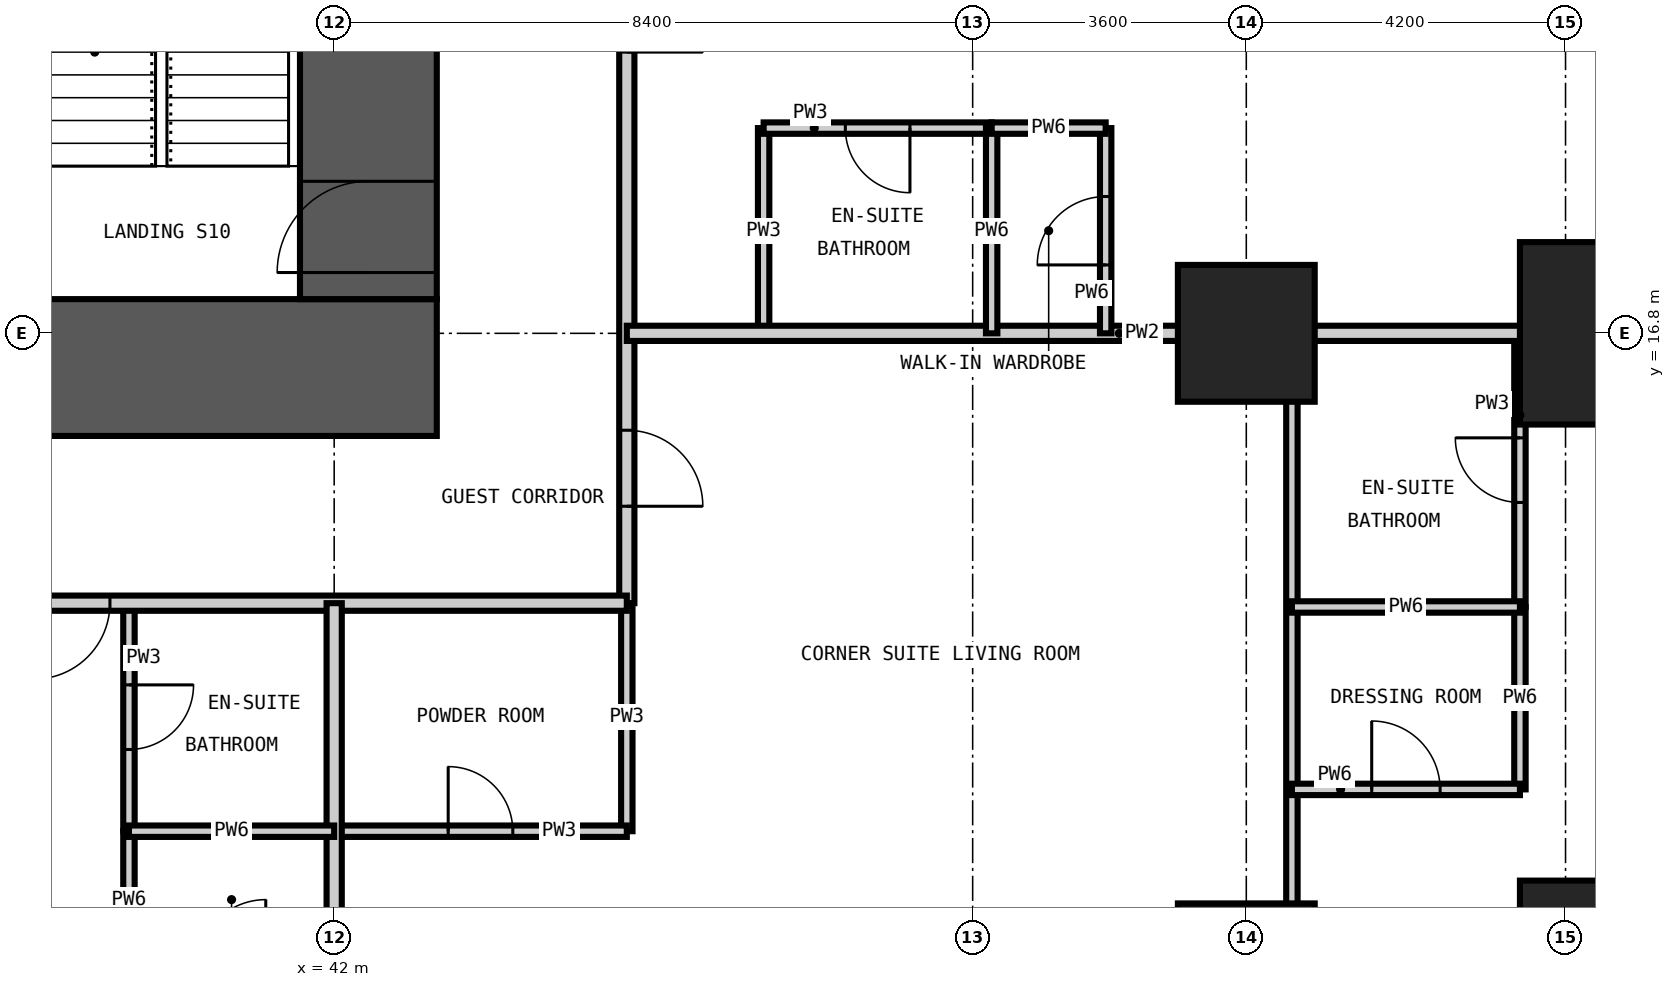
"""IFC4 building model, lengths in metres.
Left out: names, types, materials, properties, quantities, classifications, styles, units other than length and angle.
Written with IfcOpenShell. Run it as: python <this file> out.ifc"""

import sys

from ifc_helpers import new_model, si_unit, direction, frame, frame_2d, origin, origin_2d, place, context, subcontext, project, spatial, rectangle, extrude, element, fill, save


model = new_model("IFC4")
c1 = context("Model", 3, precision=1e-05, world=origin(), true_north=direction((0.0, 1.0)))
c2 = subcontext(c1, "Body", "Model", "MODEL_VIEW")
j1 = project(units=[si_unit("LENGTHUNIT", "METRE"), si_unit("PLANEANGLEUNIT", "RADIAN")], contexts=[c1])
p1 = place(None, origin())
s1 = spatial("IfcSite", under=j1, at=p1, CompositionType="ELEMENT")
p2 = place(p1, origin())
s2 = spatial("IfcBuilding", under=s1, at=p2, CompositionType="ELEMENT")
p3 = place(p2, frame((0.0, 0.0, 34.2)))
s3 = spatial("IfcBuildingStorey", under=s2, at=p3, CompositionType="ELEMENT", Elevation=34.2)
for number, where, z_axis, x_axis in (
    (1, (54.0, 8.4, -0.35), (0.0, 0.0, 1.0), (1.0, 0.0, 0.0)),
    (2, (54.0, 16.8, -0.35), (0.0, 0.0, 1.0), (1.0, 0.0, 0.0)),
):
    element("IfcColumn", number, at=place(p3, frame(where, z_axis=z_axis, x_axis=x_axis)), inside=s3, PredefinedType="COLUMN", context=c2, shape_type="SweptSolid", body=[
        extrude(rectangle(XDim=1.8, YDim=1.8, at=origin_2d()), origin(), (0.0, 0.0, 1.0), 3.6),
    ])
for number, where, z_axis, x_axis in (
    (3, (58.2, 8.4, -0.35), (0.0, 0.0, 1.0), (1.0, 0.0, 0.0)),
    (4, (58.2, 16.8, -0.35), (0.0, 0.0, 1.0), (1.0, 0.0, 0.0)),
):
    element("IfcColumn", number, at=place(p3, frame(where, z_axis=z_axis, x_axis=x_axis)), inside=s3, PredefinedType="COLUMN", context=c2, shape_type="SweptSolid", body=[
        extrude(rectangle(XDim=1.2, YDim=2.4, at=origin_2d()), origin(), (0.0, 0.0, 1.0), 3.6),
    ])
p4 = place(p3, frame((15.45, 16.35, -0.35), z_axis=(0.0, 0.0, 1.0), x_axis=(1.0, 0.0, 0.0)))
e5 = element("IfcWall", 5, at=p4, inside=s3, PredefinedType="SHEAR", context=c2, shape_type="SweptSolid", body=[
    extrude(rectangle(XDim=27.9, YDim=1.8, at=frame_2d((13.95, 0.0))), origin(), (0.0, 0.0, 1.0), 3.6),
])
p5 = place(p4, frame((13.45, 0.0, 0.35)))
e6 = element("IfcOpeningElement", 6, at=p5, cuts=e5, PredefinedType="OPENING", context=c2, shape_type="SweptSolid", body=[
    extrude(rectangle(XDim=1.0, YDim=2.1, at=frame_2d((0.5, 1.05))), frame((0.0, 0.91, 0.0), z_axis=(0.0, -1.0, 0.0), x_axis=(1.0, 0.0, 0.0)), (0.0, 0.0, 1.0), 1.82),
])
p6 = place(p4, frame((19.75, 0.0, 0.35)))
e7 = element("IfcOpeningElement", 7, at=p6, cuts=e5, PredefinedType="OPENING", context=c2, shape_type="SweptSolid", body=[
    extrude(rectangle(XDim=1.0, YDim=2.1, at=frame_2d((0.5, 1.05))), frame((0.0, 0.91, 0.0), z_axis=(0.0, -1.0, 0.0), x_axis=(1.0, 0.0, 0.0)), (0.0, 0.0, 1.0), 1.82),
])
p7 = place(p3, frame((42.45, 17.25, -0.35), z_axis=(0.0, 0.0, 1.0), x_axis=(0.0, 1.0, 0.0)))
e8 = element("IfcWall", 8, at=p7, inside=s3, PredefinedType="SHEAR", context=c2, shape_type="SweptSolid", body=[
    extrude(rectangle(XDim=24.3, YDim=1.8, at=frame_2d((12.15, 0.0))), origin(), (0.0, 0.0, 1.0), 3.6),
])
p8 = place(p7, frame((0.35, 0.0, 0.35)))
e9 = element("IfcOpeningElement", 9, at=p8, cuts=e8, PredefinedType="OPENING", context=c2, shape_type="SweptSolid", body=[
    extrude(rectangle(XDim=1.2, YDim=2.2, at=frame_2d((0.6, 1.1))), frame((0.0, 0.91, 0.0), z_axis=(0.0, -1.0, 0.0), x_axis=(1.0, 0.0, 0.0)), (0.0, 0.0, 1.0), 1.82),
])
p9 = place(p7, frame((11.65, 0.0, 0.35)))
e10 = element("IfcOpeningElement", 10, at=p9, cuts=e8, PredefinedType="OPENING", context=c2, shape_type="SweptSolid", body=[
    extrude(rectangle(XDim=1.0, YDim=2.1, at=frame_2d((0.5, 1.05))), frame((0.0, 0.91, 0.0), z_axis=(0.0, -1.0, 0.0), x_axis=(1.0, 0.0, 0.0)), (0.0, 0.0, 1.0), 1.82),
])
p10 = place(p7, frame((20.05, 0.0, 0.35)))
e11 = element("IfcOpeningElement", 11, at=p10, cuts=e8, PredefinedType="OPENING", context=c2, shape_type="SweptSolid", body=[
    extrude(rectangle(XDim=1.0, YDim=2.1, at=frame_2d((0.5, 1.05))), frame((0.0, 0.91, 0.0), z_axis=(0.0, -1.0, 0.0), x_axis=(1.0, 0.0, 0.0)), (0.0, 0.0, 1.0), 1.82),
])
p11 = place(p3, frame((39.3, 10.25, 0.0), z_axis=(0.0, 0.0, 1.0), x_axis=(0.0, 1.0, 0.0)))
e12 = element("IfcWall", 12, at=p11, inside=s3, PredefinedType="PARTITIONING", context=c2, shape_type="SweptSolid", body=[
    extrude(rectangle(XDim=3.0, YDim=0.15, at=frame_2d((1.5, 0.0))), origin(), (0.0, 0.0, 1.0), 3.25),
])
p12 = place(p11, frame((1.075, 0.0, 0.0)))
e13 = element("IfcOpeningElement", 13, at=p12, cuts=e12, PredefinedType="OPENING", context=c2, shape_type="SweptSolid", body=[
    extrude(rectangle(XDim=0.85, YDim=2.1, at=frame_2d((0.425, 1.05))), frame((0.0, 0.085, 0.0), z_axis=(0.0, -1.0, 0.0), x_axis=(1.0, 0.0, 0.0)), (0.0, 0.0, 1.0), 0.17),
])
p13 = place(p3, frame((45.85, 10.25, 0.0), z_axis=(0.0, 0.0, 1.0), x_axis=(0.0, 1.0, 0.0)))
e14 = element("IfcWall", 14, at=p13, inside=s3, PredefinedType="PARTITIONING", context=c2, shape_type="SweptSolid", body=[
    extrude(rectangle(XDim=3.0, YDim=0.15, at=frame_2d((1.5, 0.0))), origin(), (0.0, 0.0, 1.0), 3.25),
])
p14 = place(p3, frame((47.65, 16.8, 0.0), z_axis=(0.0, 0.0, 1.0), x_axis=(0.0, 1.0, 0.0)))
e15 = element("IfcWall", 15, at=p14, inside=s3, PredefinedType="PARTITIONING", context=c2, shape_type="SweptSolid", body=[
    extrude(rectangle(XDim=2.7, YDim=0.15, at=frame_2d((1.35, 0.0))), origin(), (0.0, 0.0, 1.0), 3.25),
])
p15 = place(p3, frame((57.6, 13.2, 0.0), z_axis=(0.0, 0.0, 1.0), x_axis=(0.0, 1.0, 0.0)))
e16 = element("IfcWall", 16, at=p15, inside=s3, PredefinedType="PARTITIONING", context=c2, shape_type="SweptSolid", body=[
    extrude(rectangle(XDim=3.6, YDim=0.15, at=frame_2d((1.8, 0.0))), origin(), (0.0, 0.0, 1.0), 3.25),
])
p16 = place(p15, frame((1.375, 0.0, 0.0)))
e17 = element("IfcOpeningElement", 17, at=p16, cuts=e16, PredefinedType="OPENING", context=c2, shape_type="SweptSolid", body=[
    extrude(rectangle(XDim=0.85, YDim=2.1, at=frame_2d((0.425, 1.05))), frame((0.0, 0.085, 0.0), z_axis=(0.0, -1.0, 0.0), x_axis=(1.0, 0.0, 0.0)), (0.0, 0.0, 1.0), 0.17),
])
p17 = place(p3, frame((42.0, 10.25, 0.0), z_axis=(0.0, 0.0, 1.0), x_axis=(1.0, 0.0, 0.0)))
e18 = element("IfcWall", 18, at=p17, inside=s3, PredefinedType="PARTITIONING", context=c2, shape_type="SweptSolid", body=[
    extrude(rectangle(XDim=3.85, YDim=0.15, at=frame_2d((1.925, 0.0))), origin(), (0.0, 0.0, 1.0), 3.25),
])
p18 = place(p17, frame((1.5, 0.0, 0.0)))
e19 = element("IfcOpeningElement", 19, at=p18, cuts=e18, PredefinedType="OPENING", context=c2, shape_type="SweptSolid", body=[
    extrude(rectangle(XDim=0.85, YDim=2.1, at=frame_2d((0.425, 1.05))), frame((0.0, 0.085, 0.0), z_axis=(0.0, -1.0, 0.0), x_axis=(1.0, 0.0, 0.0)), (0.0, 0.0, 1.0), 0.17),
])
p19 = place(p3, frame((47.65, 19.5, 0.0), z_axis=(0.0, 0.0, 1.0), x_axis=(1.0, 0.0, 0.0)))
e20 = element("IfcWall", 20, at=p19, inside=s3, PredefinedType="PARTITIONING", context=c2, shape_type="SweptSolid", body=[
    extrude(rectangle(XDim=3.0, YDim=0.15, at=frame_2d((1.5, 0.0))), origin(), (0.0, 0.0, 1.0), 3.25),
])
p20 = place(p19, frame((1.075, 0.0, 0.0)))
e21 = element("IfcOpeningElement", 21, at=p20, cuts=e20, PredefinedType="OPENING", context=c2, shape_type="SweptSolid", body=[
    extrude(rectangle(XDim=0.85, YDim=2.1, at=frame_2d((0.425, 1.05))), frame((0.0, 0.085, 0.0), z_axis=(0.0, -1.0, 0.0), x_axis=(1.0, 0.0, 0.0)), (0.0, 0.0, 1.0), 0.17),
])
p21 = place(p3, frame((45.85, 45.25, 0.0), z_axis=(0.0, 0.0, 1.0), x_axis=(0.0, -1.0, 0.0)))
e22 = element("IfcWall", 22, at=p21, inside=s3, PredefinedType="PARTITIONING", context=c2, shape_type="SweptSolid", body=[
    extrude(rectangle(XDim=32.0, YDim=0.2, at=frame_2d((16.0, 0.0))), origin(), (0.0, 0.0, 1.0), 3.25),
])
p22 = place(p21, frame((23.75, 0.0, 0.0)))
e23 = element("IfcOpeningElement", 23, at=p22, cuts=e22, PredefinedType="OPENING", context=c2, shape_type="SweptSolid", body=[
    extrude(rectangle(XDim=1.0, YDim=2.2, at=frame_2d((0.5, 1.1))), frame((0.0, 0.11, 0.0), z_axis=(0.0, -1.0, 0.0), x_axis=(1.0, 0.0, 0.0)), (0.0, 0.0, 1.0), 0.22),
])
p23 = place(p21, frame((15.35, 0.0, 0.0)))
e24 = element("IfcOpeningElement", 24, at=p23, cuts=e22, PredefinedType="OPENING", context=c2, shape_type="SweptSolid", body=[
    extrude(rectangle(XDim=1.0, YDim=2.2, at=frame_2d((0.5, 1.1))), frame((0.0, 0.11, 0.0), z_axis=(0.0, -1.0, 0.0), x_axis=(1.0, 0.0, 0.0)), (0.0, 0.0, 1.0), 0.22),
])
p24 = place(p21, frame((6.95, 0.0, 0.0)))
e25 = element("IfcOpeningElement", 25, at=p24, cuts=e22, PredefinedType="OPENING", context=c2, shape_type="SweptSolid", body=[
    extrude(rectangle(XDim=1.0, YDim=2.2, at=frame_2d((0.5, 1.1))), frame((0.0, 0.11, 0.0), z_axis=(0.0, -1.0, 0.0), x_axis=(1.0, 0.0, 0.0)), (0.0, 0.0, 1.0), 0.22),
])
p25 = place(p21, frame((29.725, 0.0, 0.0)))
e26 = element("IfcOpeningElement", 26, at=p25, cuts=e22, PredefinedType="OPENING", context=c2, shape_type="SweptSolid", body=[
    extrude(rectangle(XDim=1.0, YDim=2.2, at=frame_2d((0.5, 1.1))), frame((0.0, 0.11, 0.0), z_axis=(0.0, -1.0, 0.0), x_axis=(1.0, 0.0, 0.0)), (0.0, 0.0, 1.0), 0.22),
])
p26 = place(p21, frame((1.125, 0.0, 0.0)))
e27 = element("IfcOpeningElement", 27, at=p26, cuts=e22, PredefinedType="OPENING", context=c2, shape_type="SweptSolid", body=[
    extrude(rectangle(XDim=1.0, YDim=2.2, at=frame_2d((0.5, 1.1))), frame((0.0, 0.11, 0.0), z_axis=(0.0, -1.0, 0.0), x_axis=(1.0, 0.0, 0.0)), (0.0, 0.0, 1.0), 0.22),
])
p27 = place(p3, frame((45.85, 13.25, 0.0), z_axis=(0.0, 0.0, 1.0), x_axis=(-1.0, 0.0, 0.0)))
e28 = element("IfcWall", 28, at=p27, inside=s3, PredefinedType="PARTITIONING", context=c2, shape_type="SweptSolid", body=[
    extrude(rectangle(XDim=32.6, YDim=0.2, at=frame_2d((16.3, 0.0))), origin(), (0.0, 0.0, 1.0), 3.25),
])
p28 = place(p27, frame((25.1, 0.0, 0.0)))
e29 = element("IfcOpeningElement", 29, at=p28, cuts=e28, PredefinedType="OPENING", context=c2, shape_type="SweptSolid", body=[
    extrude(rectangle(XDim=1.0, YDim=2.2, at=frame_2d((0.5, 1.1))), frame((0.0, 0.11, 0.0), z_axis=(0.0, -1.0, 0.0), x_axis=(1.0, 0.0, 0.0)), (0.0, 0.0, 1.0), 0.22),
])
p29 = place(p27, frame((21.65, 0.0, 0.0)))
e30 = element("IfcOpeningElement", 30, at=p29, cuts=e28, PredefinedType="OPENING", context=c2, shape_type="SweptSolid", body=[
    extrude(rectangle(XDim=1.0, YDim=2.2, at=frame_2d((0.5, 1.1))), frame((0.0, 0.11, 0.0), z_axis=(0.0, -1.0, 0.0), x_axis=(1.0, 0.0, 0.0)), (0.0, 0.0, 1.0), 0.22),
])
p30 = place(p27, frame((11.75, 0.0, 0.0)))
e31 = element("IfcOpeningElement", 31, at=p30, cuts=e28, PredefinedType="OPENING", context=c2, shape_type="SweptSolid", body=[
    extrude(rectangle(XDim=1.0, YDim=2.2, at=frame_2d((0.5, 1.1))), frame((0.0, 0.11, 0.0), z_axis=(0.0, -1.0, 0.0), x_axis=(1.0, 0.0, 0.0)), (0.0, 0.0, 1.0), 0.22),
])
p31 = place(p27, frame((6.8, 0.0, 0.0)))
e32 = element("IfcOpeningElement", 32, at=p31, cuts=e28, PredefinedType="OPENING", context=c2, shape_type="SweptSolid", body=[
    extrude(rectangle(XDim=1.0, YDim=2.2, at=frame_2d((0.5, 1.1))), frame((0.0, 0.11, 0.0), z_axis=(0.0, -1.0, 0.0), x_axis=(1.0, 0.0, 0.0)), (0.0, 0.0, 1.0), 0.22),
])
p32 = place(p3, frame((42.0, -0.008, 0.0), z_axis=(0.0, 0.0, 1.0), x_axis=(0.0, 1.0, 0.0)))
e33 = element("IfcWall", 33, at=p32, inside=s3, PredefinedType="PARTITIONING", context=c2, shape_type="SweptSolid", body=[
    extrude(rectangle(XDim=13.258, YDim=0.2, at=frame_2d((6.629, 0.0))), origin(), (0.0, 0.0, 1.0), 3.25),
])
p33 = place(p3, frame((45.85, 16.8, 0.0), z_axis=(0.0, 0.0, 1.0), x_axis=(1.0, 0.0, 0.0)))
e34 = element("IfcWall", 34, at=p33, inside=s3, PredefinedType="PARTITIONING", context=c2, shape_type="SweptSolid", body=[
    extrude(rectangle(XDim=12.958, YDim=0.2, at=frame_2d((6.479, 0.0))), origin(), (0.0, 0.0, 1.0), 3.25),
])
p34 = place(p3, frame((39.3, 8.45, 0.0), z_axis=(0.0, 0.0, 1.0), x_axis=(0.0, 1.0, 0.0)))
e35 = element("IfcWall", 35, at=p34, inside=s3, PredefinedType="PARTITIONING", context=c2, shape_type="SweptSolid", body=[
    extrude(rectangle(XDim=1.8, YDim=0.15, at=frame_2d((0.9, 0.0))), origin(), (0.0, 0.0, 1.0), 3.25),
])
p35 = place(p3, frame((50.65, 16.8, 0.0), z_axis=(0.0, 0.0, 1.0), x_axis=(0.0, 1.0, 0.0)))
e36 = element("IfcWall", 36, at=p35, inside=s3, PredefinedType="PARTITIONING", context=c2, shape_type="SweptSolid", body=[
    extrude(rectangle(XDim=2.7, YDim=0.15, at=frame_2d((1.35, 0.0))), origin(), (0.0, 0.0, 1.0), 3.25),
])
p36 = place(p3, frame((52.15, 16.8, 0.0), z_axis=(0.0, 0.0, 1.0), x_axis=(0.0, 1.0, 0.0)))
e37 = element("IfcWall", 37, at=p36, inside=s3, PredefinedType="PARTITIONING", context=c2, shape_type="SweptSolid", body=[
    extrude(rectangle(XDim=2.7, YDim=0.15, at=frame_2d((1.35, 0.0))), origin(), (0.0, 0.0, 1.0), 3.25),
])
p37 = place(p36, frame((0.9, 0.0, 0.0)))
e38 = element("IfcOpeningElement", 38, at=p37, cuts=e37, PredefinedType="OPENING", context=c2, shape_type="SweptSolid", body=[
    extrude(rectangle(XDim=0.9, YDim=2.1, at=frame_2d((0.45, 1.05))), frame((0.0, 0.085, 0.0), z_axis=(0.0, -1.0, 0.0), x_axis=(1.0, 0.0, 0.0)), (0.0, 0.0, 1.0), 0.17),
])
p38 = place(p3, frame((54.6, -0.008, 0.0), z_axis=(0.0, 0.0, 1.0), x_axis=(0.0, 1.0, 0.0)))
e39 = element("IfcWall", 39, at=p38, inside=s3, PredefinedType="PARTITIONING", context=c2, shape_type="SweptSolid", body=[
    extrude(rectangle(XDim=16.808, YDim=0.15, at=frame_2d((8.404, 0.0))), origin(), (0.0, 0.0, 1.0), 3.25),
])
p39 = place(p38, frame((4.958, 0.0, 0.0)))
e40 = element("IfcOpeningElement", 40, at=p39, cuts=e39, PredefinedType="OPENING", context=c2, shape_type="SweptSolid", body=[
    extrude(rectangle(XDim=0.9, YDim=2.1, at=frame_2d((0.45, 1.05))), frame((0.0, 0.085, 0.0), z_axis=(0.0, -1.0, 0.0), x_axis=(1.0, 0.0, 0.0)), (0.0, 0.0, 1.0), 0.17),
])
p40 = place(p3, frame((57.6, 10.8, 0.0), z_axis=(0.0, 0.0, 1.0), x_axis=(0.0, 1.0, 0.0)))
e41 = element("IfcWall", 41, at=p40, inside=s3, PredefinedType="PARTITIONING", context=c2, shape_type="SweptSolid", body=[
    extrude(rectangle(XDim=2.4, YDim=0.15, at=frame_2d((1.2, 0.0))), origin(), (0.0, 0.0, 1.0), 3.25),
])
p41 = place(p3, frame((39.3, 10.25, 0.0), z_axis=(0.0, 0.0, 1.0), x_axis=(1.0, 0.0, 0.0)))
e42 = element("IfcWall", 42, at=p41, inside=s3, PredefinedType="PARTITIONING", context=c2, shape_type="SweptSolid", body=[
    extrude(rectangle(XDim=2.7, YDim=0.15, at=frame_2d((1.35, 0.0))), origin(), (0.0, 0.0, 1.0), 3.25),
])
p42 = place(p3, frame((54.6, 10.8, 0.0), z_axis=(0.0, 0.0, 1.0), x_axis=(1.0, 0.0, 0.0)))
e43 = element("IfcWall", 43, at=p42, inside=s3, PredefinedType="PARTITIONING", context=c2, shape_type="SweptSolid", body=[
    extrude(rectangle(XDim=3.0, YDim=0.15, at=frame_2d((1.5, 0.0))), origin(), (0.0, 0.0, 1.0), 3.25),
])
p43 = place(p42, frame((1.05, 0.0, 0.0)))
e44 = element("IfcOpeningElement", 44, at=p43, cuts=e43, PredefinedType="OPENING", context=c2, shape_type="SweptSolid", body=[
    extrude(rectangle(XDim=0.9, YDim=2.1, at=frame_2d((0.45, 1.05))), frame((0.0, 0.085, 0.0), z_axis=(0.0, -1.0, 0.0), x_axis=(1.0, 0.0, 0.0)), (0.0, 0.0, 1.0), 0.17),
])
p44 = place(p3, frame((54.6, 13.2, 0.0), z_axis=(0.0, 0.0, 1.0), x_axis=(1.0, 0.0, 0.0)))
e45 = element("IfcWall", 45, at=p44, inside=s3, PredefinedType="PARTITIONING", context=c2, shape_type="SweptSolid", body=[
    extrude(rectangle(XDim=3.0, YDim=0.15, at=frame_2d((1.5, 0.0))), origin(), (0.0, 0.0, 1.0), 3.25),
])
p45 = place(p3, frame((50.65, 19.5, 0.0), z_axis=(0.0, 0.0, 1.0), x_axis=(1.0, 0.0, 0.0)))
e46 = element("IfcWall", 46, at=p45, inside=s3, PredefinedType="PARTITIONING", context=c2, shape_type="SweptSolid", body=[
    extrude(rectangle(XDim=1.5, YDim=0.15, at=frame_2d((0.75, 0.0))), origin(), (0.0, 0.0, 1.0), 3.25),
])
p46 = place(p8, origin())
e47 = element("IfcDoor", 47, at=p46, inside=s3, OperationType="SINGLE_SWING_LEFT", PredefinedType="DOOR", context=c2, shape_type="SweptSolid", body=[
    extrude(rectangle(XDim=1.2, YDim=2.2, at=frame_2d((0.6, 1.1))), frame((0.0, 0.025, 0.0), z_axis=(0.0, -1.0, 0.0), x_axis=(1.0, 0.0, 0.0)), (0.0, 0.0, 1.0), 0.05),
])
fill(e9, e47)
p47 = place(p31, origin())
e48 = element("IfcDoor", 48, at=p47, inside=s3, OperationType="SINGLE_SWING_RIGHT", PredefinedType="DOOR", context=c2, shape_type="SweptSolid", body=[
    extrude(rectangle(XDim=1.0, YDim=2.2, at=frame_2d((0.5, 1.1))), frame((0.0, 0.025, 0.0), z_axis=(0.0, -1.0, 0.0), x_axis=(1.0, 0.0, 0.0)), (0.0, 0.0, 1.0), 0.05),
])
fill(e32, e48)
p48 = place(p12, frame((0.85, 0.0, 0.0), z_axis=(0.0, 0.0, 1.0), x_axis=(-1.0, 0.0, 0.0)))
e49 = element("IfcDoor", 49, at=p48, inside=s3, OperationType="SINGLE_SWING_LEFT", PredefinedType="DOOR", context=c2, shape_type="SweptSolid", body=[
    extrude(rectangle(XDim=0.85, YDim=2.1, at=frame_2d((0.425, 1.05))), frame((0.0, 0.025, 0.0), z_axis=(0.0, -1.0, 0.0), x_axis=(1.0, 0.0, 0.0)), (0.0, 0.0, 1.0), 0.05),
])
fill(e13, e49)
p49 = place(p20, frame((0.85, 0.0, 0.0), z_axis=(0.0, 0.0, 1.0), x_axis=(-1.0, 0.0, 0.0)))
e50 = element("IfcDoor", 50, at=p49, inside=s3, OperationType="SINGLE_SWING_LEFT", PredefinedType="DOOR", context=c2, shape_type="SweptSolid", body=[
    extrude(rectangle(XDim=0.85, YDim=2.1, at=frame_2d((0.425, 1.05))), frame((0.0, 0.025, 0.0), z_axis=(0.0, -1.0, 0.0), x_axis=(1.0, 0.0, 0.0)), (0.0, 0.0, 1.0), 0.05),
])
fill(e21, e50)
p50 = place(p37, origin())
e51 = element("IfcDoor", 51, at=p50, inside=s3, OperationType="SINGLE_SWING_LEFT", PredefinedType="DOOR", context=c2, shape_type="SweptSolid", body=[
    extrude(rectangle(XDim=0.9, YDim=2.1, at=frame_2d((0.45, 1.05))), frame((0.0, 0.025, 0.0), z_axis=(0.0, -1.0, 0.0), x_axis=(1.0, 0.0, 0.0)), (0.0, 0.0, 1.0), 0.05),
])
fill(e38, e51)
p51 = place(p25, origin())
e52 = element("IfcDoor", 52, at=p51, inside=s3, OperationType="SINGLE_SWING_RIGHT", PredefinedType="DOOR", context=c2, shape_type="SweptSolid", body=[
    extrude(rectangle(XDim=1.0, YDim=2.2, at=frame_2d((0.5, 1.1))), frame((0.0, 0.025, 0.0), z_axis=(0.0, -1.0, 0.0), x_axis=(1.0, 0.0, 0.0)), (0.0, 0.0, 1.0), 0.05),
])
fill(e26, e52)
p52 = place(p18, origin())
e53 = element("IfcDoor", 53, at=p52, inside=s3, OperationType="SINGLE_SWING_LEFT", PredefinedType="DOOR", context=c2, shape_type="SweptSolid", body=[
    extrude(rectangle(XDim=0.85, YDim=2.1, at=frame_2d((0.425, 1.05))), frame((0.0, 0.025, 0.0), z_axis=(0.0, -1.0, 0.0), x_axis=(1.0, 0.0, 0.0)), (0.0, 0.0, 1.0), 0.05),
])
fill(e19, e53)
p53 = place(p16, origin())
e54 = element("IfcDoor", 54, at=p53, inside=s3, OperationType="SINGLE_SWING_RIGHT", PredefinedType="DOOR", context=c2, shape_type="SweptSolid", body=[
    extrude(rectangle(XDim=0.85, YDim=2.1, at=frame_2d((0.425, 1.05))), frame((0.0, 0.025, 0.0), z_axis=(0.0, -1.0, 0.0), x_axis=(1.0, 0.0, 0.0)), (0.0, 0.0, 1.0), 0.05),
])
fill(e17, e54)
p54 = place(p43, origin())
e55 = element("IfcDoor", 55, at=p54, inside=s3, OperationType="SINGLE_SWING_LEFT", PredefinedType="DOOR", context=c2, shape_type="SweptSolid", body=[
    extrude(rectangle(XDim=0.9, YDim=2.1, at=frame_2d((0.45, 1.05))), frame((0.0, 0.025, 0.0), z_axis=(0.0, -1.0, 0.0), x_axis=(1.0, 0.0, 0.0)), (0.0, 0.0, 1.0), 0.05),
])
fill(e44, e55)
save(model, sys.argv[1])
